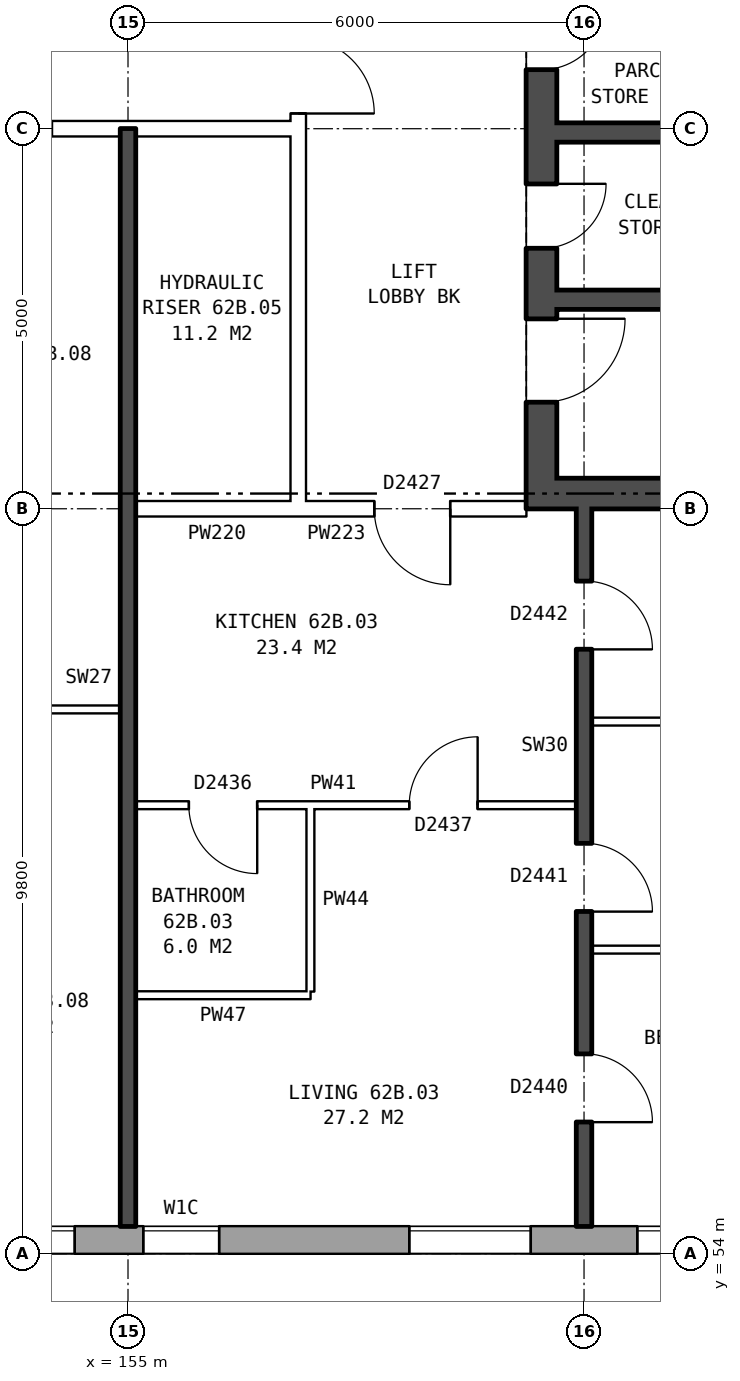
"""IFC4 building model, lengths in metres.
Left out: names, types, materials, properties, quantities, classifications, styles, units other than length and angle.
Written with IfcOpenShell. Run it as: python <this file> out.ifc"""

import sys

from ifc_helpers import new_model, si_unit, direction, frame, frame_2d, origin, place, context, subcontext, project, spatial, rectangle, extrude, element, fill, save


model = new_model("IFC4")
c1 = context("Model", 3, precision=1e-05, world=origin(), true_north=direction((0.0, 1.0)))
c2 = subcontext(c1, "Body", "Model", "MODEL_VIEW")
j1 = project(units=[si_unit("LENGTHUNIT", "METRE"), si_unit("PLANEANGLEUNIT", "RADIAN")], contexts=[c1])
p1 = place(None, origin())
s1 = spatial("IfcSite", under=j1, at=p1, CompositionType="ELEMENT")
p2 = place(p1, origin())
s2 = spatial("IfcBuilding", under=s1, at=p2, CompositionType="ELEMENT")
p3 = place(p2, frame((0.0, 0.0, 221.4)))
s3 = spatial("IfcBuildingStorey", under=s2, at=p3, CompositionType="ELEMENT", Elevation=221.4)
p4 = place(p3, frame((132.05, 54.18, 0.0), z_axis=(0.0, 0.0, 1.0), x_axis=(1.0, 0.0, 0.0)))
e1 = element("IfcWall", 1, at=p4, inside=s3, PredefinedType="STANDARD", context=c2, shape_type="SweptSolid", body=[
    extrude(rectangle(XDim=33.875, YDim=0.36, at=frame_2d((16.938, 0.0))), origin(), (0.0, 0.0, 1.0), 2.85),
])
p5 = place(p4, frame((2.65, 0.0, 0.8)))
e2 = element("IfcOpeningElement", 2, at=p5, cuts=e1, PredefinedType="OPENING", context=c2, shape_type="SweptSolid", body=[
    extrude(rectangle(XDim=1.6, YDim=1.8, at=frame_2d((0.8, 0.9))), frame((0.0, 0.19, 0.0), z_axis=(0.0, -1.0, 0.0), x_axis=(1.0, 0.0, 0.0)), (0.0, 0.0, 1.0), 0.38),
])
p6 = place(p4, frame((5.65, 0.0, 0.8)))
e3 = element("IfcOpeningElement", 3, at=p6, cuts=e1, PredefinedType="OPENING", context=c2, shape_type="SweptSolid", body=[
    extrude(rectangle(XDim=1.6, YDim=1.8, at=frame_2d((0.8, 0.9))), frame((0.0, 0.19, 0.0), z_axis=(0.0, -1.0, 0.0), x_axis=(1.0, 0.0, 0.0)), (0.0, 0.0, 1.0), 0.38),
])
p7 = place(p4, frame((7.55, 0.0, 0.8)))
e4 = element("IfcOpeningElement", 4, at=p7, cuts=e1, PredefinedType="OPENING", context=c2, shape_type="SweptSolid", body=[
    extrude(rectangle(XDim=1.6, YDim=1.8, at=frame_2d((0.8, 0.9))), frame((0.0, 0.19, 0.0), z_axis=(0.0, -1.0, 0.0), x_axis=(1.0, 0.0, 0.0)), (0.0, 0.0, 1.0), 0.38),
])
p8 = place(p4, frame((11.65, 0.0, 0.8)))
e5 = element("IfcOpeningElement", 5, at=p8, cuts=e1, PredefinedType="OPENING", context=c2, shape_type="SweptSolid", body=[
    extrude(rectangle(XDim=1.6, YDim=1.8, at=frame_2d((0.8, 0.9))), frame((0.0, 0.19, 0.0), z_axis=(0.0, -1.0, 0.0), x_axis=(1.0, 0.0, 0.0)), (0.0, 0.0, 1.0), 0.38),
])
p9 = place(p4, frame((14.65, 0.0, 0.8)))
e6 = element("IfcOpeningElement", 6, at=p9, cuts=e1, PredefinedType="OPENING", context=c2, shape_type="SweptSolid", body=[
    extrude(rectangle(XDim=1.6, YDim=1.8, at=frame_2d((0.8, 0.9))), frame((0.0, 0.19, 0.0), z_axis=(0.0, -1.0, 0.0), x_axis=(1.0, 0.0, 0.0)), (0.0, 0.0, 1.0), 0.38),
])
p10 = place(p4, frame((17.65, 0.0, 0.8)))
e7 = element("IfcOpeningElement", 7, at=p10, cuts=e1, PredefinedType="OPENING", context=c2, shape_type="SweptSolid", body=[
    extrude(rectangle(XDim=1.6, YDim=1.8, at=frame_2d((0.8, 0.9))), frame((0.0, 0.19, 0.0), z_axis=(0.0, -1.0, 0.0), x_axis=(1.0, 0.0, 0.0)), (0.0, 0.0, 1.0), 0.38),
])
p11 = place(p4, frame((20.65, 0.0, 0.8)))
e8 = element("IfcOpeningElement", 8, at=p11, cuts=e1, PredefinedType="OPENING", context=c2, shape_type="SweptSolid", body=[
    extrude(rectangle(XDim=1.6, YDim=1.8, at=frame_2d((0.8, 0.9))), frame((0.0, 0.19, 0.0), z_axis=(0.0, -1.0, 0.0), x_axis=(1.0, 0.0, 0.0)), (0.0, 0.0, 1.0), 0.38),
])
p12 = place(p4, frame((23.15, 0.0, 0.8)))
e9 = element("IfcOpeningElement", 9, at=p12, cuts=e1, PredefinedType="OPENING", context=c2, shape_type="SweptSolid", body=[
    extrude(rectangle(XDim=1.0, YDim=1.8, at=frame_2d((0.5, 0.9))), frame((0.0, 0.19, 0.0), z_axis=(0.0, -1.0, 0.0), x_axis=(1.0, 0.0, 0.0)), (0.0, 0.0, 1.0), 0.38),
])
p13 = place(p4, frame((26.65, 0.0, 0.8)))
e10 = element("IfcOpeningElement", 10, at=p13, cuts=e1, PredefinedType="OPENING", context=c2, shape_type="SweptSolid", body=[
    extrude(rectangle(XDim=1.6, YDim=1.8, at=frame_2d((0.8, 0.9))), frame((0.0, 0.19, 0.0), z_axis=(0.0, -1.0, 0.0), x_axis=(1.0, 0.0, 0.0)), (0.0, 0.0, 1.0), 0.38),
])
p14 = place(p4, frame((29.65, 0.0, 0.8)))
e11 = element("IfcOpeningElement", 11, at=p14, cuts=e1, PredefinedType="OPENING", context=c2, shape_type="SweptSolid", body=[
    extrude(rectangle(XDim=1.6, YDim=1.8, at=frame_2d((0.8, 0.9))), frame((0.0, 0.19, 0.0), z_axis=(0.0, -1.0, 0.0), x_axis=(1.0, 0.0, 0.0)), (0.0, 0.0, 1.0), 0.38),
])
p15 = place(p4, frame((9.45, 0.0, 1.7)))
e12 = element("IfcOpeningElement", 12, at=p15, cuts=e1, PredefinedType="OPENING", context=c2, shape_type="SweptSolid", body=[
    extrude(rectangle(XDim=0.6, YDim=0.9, at=frame_2d((0.3, 0.45))), frame((0.0, 0.19, 0.0), z_axis=(0.0, -1.0, 0.0), x_axis=(1.0, 0.0, 0.0)), (0.0, 0.0, 1.0), 0.38),
])
p16 = place(p3, frame((160.44, 76.2, 0.0), z_axis=(0.0, 0.0, 1.0), x_axis=(0.0, -1.0, 0.0)))
e13 = element("IfcWall", 13, at=p16, inside=s3, PredefinedType="SHEAR", context=c2, shape_type="SweptSolid", body=[
    extrude(rectangle(XDim=12.4, YDim=0.4, at=frame_2d((6.2, 0.0))), origin(), (0.0, 0.0, 1.0), 2.85),
])
p17 = place(p16, frame((1.325, 0.0, 0.0)))
e14 = element("IfcOpeningElement", 14, at=p17, cuts=e13, PredefinedType="OPENING", context=c2, shape_type="SweptSolid", body=[
    extrude(rectangle(XDim=1.1, YDim=2.1, at=frame_2d((0.55, 1.05))), frame((0.0, 0.21, 0.0), z_axis=(0.0, -1.0, 0.0), x_axis=(1.0, 0.0, 0.0)), (0.0, 0.0, 1.0), 0.42),
])
p18 = place(p16, frame((3.625, 0.0, 0.0)))
e15 = element("IfcOpeningElement", 15, at=p18, cuts=e13, PredefinedType="OPENING", context=c2, shape_type="SweptSolid", body=[
    extrude(rectangle(XDim=0.85, YDim=2.1, at=frame_2d((0.425, 1.05))), frame((0.0, 0.21, 0.0), z_axis=(0.0, -1.0, 0.0), x_axis=(1.0, 0.0, 0.0)), (0.0, 0.0, 1.0), 0.42),
])
p19 = place(p16, frame((5.775, 0.0, 0.0)))
e16 = element("IfcOpeningElement", 16, at=p19, cuts=e13, PredefinedType="OPENING", context=c2, shape_type="SweptSolid", body=[
    extrude(rectangle(XDim=0.85, YDim=2.1, at=frame_2d((0.425, 1.05))), frame((0.0, 0.21, 0.0), z_axis=(0.0, -1.0, 0.0), x_axis=(1.0, 0.0, 0.0)), (0.0, 0.0, 1.0), 0.42),
])
p20 = place(p16, frame((9.9, 0.0, 0.0)))
e17 = element("IfcOpeningElement", 17, at=p20, cuts=e13, PredefinedType="OPENING", context=c2, shape_type="SweptSolid", body=[
    extrude(rectangle(XDim=1.1, YDim=2.1, at=frame_2d((0.55, 1.05))), frame((0.0, 0.21, 0.0), z_axis=(0.0, -1.0, 0.0), x_axis=(1.0, 0.0, 0.0)), (0.0, 0.0, 1.0), 0.42),
])
p21 = place(p16, frame((8.125, 0.0, 0.0)))
e18 = element("IfcOpeningElement", 18, at=p21, cuts=e13, PredefinedType="OPENING", context=c2, shape_type="SweptSolid", body=[
    extrude(rectangle(XDim=0.85, YDim=2.1, at=frame_2d((0.425, 1.05))), frame((0.0, 0.21, 0.0), z_axis=(0.0, -1.0, 0.0), x_axis=(1.0, 0.0, 0.0)), (0.0, 0.0, 1.0), 0.42),
])
p22 = place(p3, frame((160.64, 64.0, 0.0), z_axis=(0.0, 0.0, 1.0), x_axis=(1.0, 0.0, 0.0)))
e19 = element("IfcWall", 19, at=p22, inside=s3, PredefinedType="SHEAR", context=c2, shape_type="SweptSolid", body=[
    extrude(rectangle(XDim=7.6, YDim=0.4, at=frame_2d((3.8, 0.0))), origin(), (0.0, 0.0, 1.0), 2.85),
])
p23 = place(p3, frame((160.64, 68.75, 0.0), z_axis=(0.0, 0.0, 1.0), x_axis=(1.0, 0.0, 0.0)))
e20 = element("IfcWall", 20, at=p23, inside=s3, PredefinedType="SHEAR", context=c2, shape_type="SweptSolid", body=[
    extrude(rectangle(XDim=7.6, YDim=0.25, at=frame_2d((3.8, 0.0))), origin(), (0.0, 0.0, 1.0), 2.85),
])
p24 = place(p23, frame((5.175, 0.0, 0.0)))
e21 = element("IfcOpeningElement", 21, at=p24, cuts=e20, PredefinedType="OPENING", context=c2, shape_type="SweptSolid", body=[
    extrude(rectangle(XDim=1.1, YDim=2.1, at=frame_2d((0.55, 1.05))), frame((0.0, 0.135, 0.0), z_axis=(0.0, -1.0, 0.0), x_axis=(1.0, 0.0, 0.0)), (0.0, 0.0, 1.0), 0.27),
])
p25 = place(p23, frame((3.35, 0.0, 0.0)))
e22 = element("IfcOpeningElement", 22, at=p25, cuts=e20, PredefinedType="OPENING", context=c2, shape_type="SweptSolid", body=[
    extrude(rectangle(XDim=0.85, YDim=2.1, at=frame_2d((0.425, 1.05))), frame((0.0, 0.135, 0.0), z_axis=(0.0, -1.0, 0.0), x_axis=(1.0, 0.0, 0.0)), (0.0, 0.0, 1.0), 0.27),
])
p26 = place(p3, frame((160.64, 66.55, 0.0), z_axis=(0.0, 0.0, 1.0), x_axis=(1.0, 0.0, 0.0)))
e23 = element("IfcWall", 23, at=p26, inside=s3, PredefinedType="SHEAR", context=c2, shape_type="SweptSolid", body=[
    extrude(rectangle(XDim=2.525, YDim=0.25, at=frame_2d((1.263, 0.0))), origin(), (0.0, 0.0, 1.0), 2.85),
])
p27 = place(p3, frame((157.24, 63.9, 0.0), z_axis=(0.0, 0.0, 1.0), x_axis=(0.0, 1.0, 0.0)))
e24 = element("IfcWall", 24, at=p27, inside=s3, PredefinedType="PARTITIONING", context=c2, shape_type="SweptSolid", body=[
    extrude(rectangle(XDim=12.2, YDim=0.2, at=frame_2d((6.1, 0.0))), origin(), (0.0, 0.0, 1.0), 2.85),
])
p28 = place(p27, frame((5.1, 0.0, 0.0)))
e25 = element("IfcOpeningElement", 25, at=p28, cuts=e24, PredefinedType="OPENING", context=c2, shape_type="SweptSolid", body=[
    extrude(rectangle(XDim=2.0, YDim=2.1, at=frame_2d((1.0, 1.05))), frame((0.0, 0.11, 0.0), z_axis=(0.0, -1.0, 0.0), x_axis=(1.0, 0.0, 0.0)), (0.0, 0.0, 1.0), 0.22),
])
p29 = place(p3, frame((155.1, 57.4, 0.0), z_axis=(0.0, 0.0, 1.0), x_axis=(1.0, 0.0, 0.0)))
e26 = element("IfcWall", 26, at=p29, inside=s3, PredefinedType="PARTITIONING", context=c2, shape_type="SweptSolid", body=[
    extrude(rectangle(XDim=2.3, YDim=0.1, at=frame_2d((1.15, 0.0))), origin(), (0.0, 0.0, 1.0), 2.85),
])
p30 = place(p3, frame((161.1, 58.0, 0.0), z_axis=(0.0, 0.0, 1.0), x_axis=(1.0, 0.0, 0.0)))
e27 = element("IfcWall", 27, at=p30, inside=s3, PredefinedType="PARTITIONING", context=c2, shape_type="SweptSolid", body=[
    extrude(rectangle(XDim=7.54, YDim=0.1, at=frame_2d((3.77, 0.0))), origin(), (0.0, 0.0, 1.0), 2.85),
])
p31 = place(p3, frame((155.1, 59.9, 0.0), z_axis=(0.0, 0.0, 1.0), x_axis=(1.0, 0.0, 0.0)))
e28 = element("IfcWall", 28, at=p31, inside=s3, PredefinedType="PARTITIONING", context=c2, shape_type="SweptSolid", body=[
    extrude(rectangle(XDim=5.8, YDim=0.1, at=frame_2d((2.9, 0.0))), origin(), (0.0, 0.0, 1.0), 2.85),
])
p32 = place(p31, frame((3.6, 0.0, 0.0)))
e29 = element("IfcOpeningElement", 29, at=p32, cuts=e28, PredefinedType="OPENING", context=c2, shape_type="SweptSolid", body=[
    extrude(rectangle(XDim=0.9, YDim=2.1, at=frame_2d((0.45, 1.05))), frame((0.0, 0.06, 0.0), z_axis=(0.0, -1.0, 0.0), x_axis=(1.0, 0.0, 0.0)), (0.0, 0.0, 1.0), 0.12),
])
p33 = place(p31, frame((0.7, 0.0, 0.0)))
e30 = element("IfcOpeningElement", 30, at=p33, cuts=e28, PredefinedType="OPENING", context=c2, shape_type="SweptSolid", body=[
    extrude(rectangle(XDim=0.9, YDim=2.1, at=frame_2d((0.45, 1.05))), frame((0.0, 0.06, 0.0), z_axis=(0.0, -1.0, 0.0), x_axis=(1.0, 0.0, 0.0)), (0.0, 0.0, 1.0), 0.12),
])
p34 = place(p3, frame((161.1, 61.0, 0.0), z_axis=(0.0, 0.0, 1.0), x_axis=(1.0, 0.0, 0.0)))
e31 = element("IfcWall", 31, at=p34, inside=s3, PredefinedType="PARTITIONING", context=c2, shape_type="SweptSolid", body=[
    extrude(rectangle(XDim=7.54, YDim=0.1, at=frame_2d((3.77, 0.0))), origin(), (0.0, 0.0, 1.0), 2.85),
])
p35 = place(p3, frame((152.0, 61.16, 0.0), z_axis=(0.0, 0.0, 1.0), x_axis=(1.0, 0.0, 0.0)))
e32 = element("IfcWall", 32, at=p35, inside=s3, PredefinedType="PARTITIONING", context=c2, shape_type="SweptSolid", body=[
    extrude(rectangle(XDim=2.9, YDim=0.1, at=frame_2d((1.45, 0.0))), origin(), (0.0, 0.0, 1.0), 2.85),
])
p36 = place(p35, frame((1.0, 0.0, 0.0)))
e33 = element("IfcOpeningElement", 33, at=p36, cuts=e32, PredefinedType="OPENING", context=c2, shape_type="SweptSolid", body=[
    extrude(rectangle(XDim=0.9, YDim=2.1, at=frame_2d((0.45, 1.05))), frame((0.0, 0.06, 0.0), z_axis=(0.0, -1.0, 0.0), x_axis=(1.0, 0.0, 0.0)), (0.0, 0.0, 1.0), 0.12),
])
p37 = place(p3, frame((155.1, 63.8, 0.0), z_axis=(0.0, 0.0, 1.0), x_axis=(1.0, 0.0, 0.0)))
e34 = element("IfcWall", 34, at=p37, inside=s3, PredefinedType="PARTITIONING", context=c2, shape_type="SweptSolid", body=[
    extrude(rectangle(XDim=2.14, YDim=0.2, at=frame_2d((1.07, 0.0))), origin(), (0.0, 0.0, 1.0), 2.85),
])
p38 = place(p3, frame((157.24, 63.8, 0.0), z_axis=(0.0, 0.0, 1.0), x_axis=(1.0, 0.0, 0.0)))
e35 = element("IfcWall", 35, at=p38, inside=s3, PredefinedType="PARTITIONING", context=c2, shape_type="SweptSolid", body=[
    extrude(rectangle(XDim=3.0, YDim=0.2, at=frame_2d((1.5, 0.0))), origin(), (0.0, 0.0, 1.0), 2.85),
])
p39 = place(p38, frame((1.0, 0.0, 0.0)))
e36 = element("IfcOpeningElement", 36, at=p39, cuts=e35, PredefinedType="OPENING", context=c2, shape_type="SweptSolid", body=[
    extrude(rectangle(XDim=1.0, YDim=2.1, at=frame_2d((0.5, 1.05))), frame((0.0, 0.11, 0.0), z_axis=(0.0, -1.0, 0.0), x_axis=(1.0, 0.0, 0.0)), (0.0, 0.0, 1.0), 0.22),
])
p40 = place(p3, frame((142.76, 68.8, 0.0), z_axis=(0.0, 0.0, 1.0), x_axis=(1.0, 0.0, 0.0)))
e37 = element("IfcWall", 37, at=p40, inside=s3, PredefinedType="PARTITIONING", context=c2, shape_type="SweptSolid", body=[
    extrude(rectangle(XDim=14.48, YDim=0.2, at=frame_2d((7.24, 0.0))), origin(), (0.0, 0.0, 1.0), 2.85),
])
p41 = place(p40, frame((1.12, 0.0, 0.0)))
e38 = element("IfcOpeningElement", 38, at=p41, cuts=e37, PredefinedType="OPENING", context=c2, shape_type="SweptSolid", body=[
    extrude(rectangle(XDim=1.0, YDim=2.1, at=frame_2d((0.5, 1.05))), frame((0.0, 0.11, 0.0), z_axis=(0.0, -1.0, 0.0), x_axis=(1.0, 0.0, 0.0)), (0.0, 0.0, 1.0), 0.22),
])
p42 = place(p40, frame((10.24, 0.0, 0.0)))
e39 = element("IfcOpeningElement", 39, at=p42, cuts=e37, PredefinedType="OPENING", context=c2, shape_type="SweptSolid", body=[
    extrude(rectangle(XDim=1.0, YDim=2.1, at=frame_2d((0.5, 1.05))), frame((0.0, 0.11, 0.0), z_axis=(0.0, -1.0, 0.0), x_axis=(1.0, 0.0, 0.0)), (0.0, 0.0, 1.0), 0.22),
])
p43 = place(p3, frame((155.0, 54.36, 0.0), z_axis=(0.0, 0.0, 1.0), x_axis=(0.0, 1.0, 0.0)))
e40 = element("IfcWall", 40, at=p43, inside=s3, PredefinedType="SOLIDWALL", context=c2, shape_type="SweptSolid", body=[
    extrude(rectangle(XDim=14.44, YDim=0.2, at=frame_2d((7.22, 0.0))), origin(), (0.0, 0.0, 1.0), 2.85),
])
p44 = place(p3, frame((157.4, 57.45, 0.0), z_axis=(0.0, 0.0, 1.0), x_axis=(0.0, 1.0, 0.0)))
e41 = element("IfcWall", 41, at=p44, inside=s3, PredefinedType="PARTITIONING", context=c2, shape_type="SweptSolid", body=[
    extrude(rectangle(XDim=2.4, YDim=0.1, at=frame_2d((1.2, 0.0))), origin(), (0.0, 0.0, 1.0), 2.85),
])
p45 = place(p3, frame((161.0, 54.36, 0.0), z_axis=(0.0, 0.0, 1.0), x_axis=(0.0, 1.0, 0.0)))
e42 = element("IfcWall", 42, at=p45, inside=s3, PredefinedType="SOLIDWALL", context=c2, shape_type="SweptSolid", body=[
    extrude(rectangle(XDim=9.44, YDim=0.2, at=frame_2d((4.72, 0.0))), origin(), (0.0, 0.0, 1.0), 2.85),
])
p46 = place(p45, frame((1.37, 0.0, 0.0)))
e43 = element("IfcOpeningElement", 43, at=p46, cuts=e42, PredefinedType="OPENING", context=c2, shape_type="SweptSolid", body=[
    extrude(rectangle(XDim=0.9, YDim=2.1, at=frame_2d((0.45, 1.05))), frame((0.0, 0.11, 0.0), z_axis=(0.0, -1.0, 0.0), x_axis=(1.0, 0.0, 0.0)), (0.0, 0.0, 1.0), 0.22),
])
p47 = place(p45, frame((4.14, 0.0, 0.0)))
e44 = element("IfcOpeningElement", 44, at=p47, cuts=e42, PredefinedType="OPENING", context=c2, shape_type="SweptSolid", body=[
    extrude(rectangle(XDim=0.9, YDim=2.1, at=frame_2d((0.45, 1.05))), frame((0.0, 0.11, 0.0), z_axis=(0.0, -1.0, 0.0), x_axis=(1.0, 0.0, 0.0)), (0.0, 0.0, 1.0), 0.22),
])
p48 = place(p45, frame((7.59, 0.0, 0.0)))
e45 = element("IfcOpeningElement", 45, at=p48, cuts=e42, PredefinedType="OPENING", context=c2, shape_type="SweptSolid", body=[
    extrude(rectangle(XDim=0.9, YDim=2.1, at=frame_2d((0.45, 1.05))), frame((0.0, 0.11, 0.0), z_axis=(0.0, -1.0, 0.0), x_axis=(1.0, 0.0, 0.0)), (0.0, 0.0, 1.0), 0.22),
])
p49 = place(p11, origin())
e46 = element("IfcWindow", 46, at=p49, inside=s3, PartitioningType="SINGLE_PANEL", PredefinedType="WINDOW", context=c2, shape_type="SweptSolid", body=[
    extrude(rectangle(XDim=1.6, YDim=1.8, at=frame_2d((0.8, 0.9))), frame((0.0, 0.15, 0.0), z_axis=(0.0, -1.0, 0.0), x_axis=(1.0, 0.0, 0.0)), (0.0, 0.0, 1.0), 0.06),
])
fill(e8, e46)
p50 = place(p12, origin())
e47 = element("IfcWindow", 47, at=p50, inside=s3, PartitioningType="SINGLE_PANEL", PredefinedType="WINDOW", context=c2, shape_type="SweptSolid", body=[
    extrude(rectangle(XDim=1.0, YDim=1.8, at=frame_2d((0.5, 0.9))), frame((0.0, 0.15, 0.0), z_axis=(0.0, -1.0, 0.0), x_axis=(1.0, 0.0, 0.0)), (0.0, 0.0, 1.0), 0.06),
])
fill(e9, e47)
p51 = place(p13, origin())
e48 = element("IfcWindow", 48, at=p51, inside=s3, PartitioningType="SINGLE_PANEL", PredefinedType="WINDOW", context=c2, shape_type="SweptSolid", body=[
    extrude(rectangle(XDim=1.6, YDim=1.8, at=frame_2d((0.8, 0.9))), frame((0.0, 0.15, 0.0), z_axis=(0.0, -1.0, 0.0), x_axis=(1.0, 0.0, 0.0)), (0.0, 0.0, 1.0), 0.06),
])
fill(e10, e48)
p52 = place(p14, origin())
e49 = element("IfcWindow", 49, at=p52, inside=s3, PartitioningType="SINGLE_PANEL", PredefinedType="WINDOW", context=c2, shape_type="SweptSolid", body=[
    extrude(rectangle(XDim=1.6, YDim=1.8, at=frame_2d((0.8, 0.9))), frame((0.0, 0.15, 0.0), z_axis=(0.0, -1.0, 0.0), x_axis=(1.0, 0.0, 0.0)), (0.0, 0.0, 1.0), 0.06),
])
fill(e11, e49)
p53 = place(p19, origin())
e50 = element("IfcDoor", 50, at=p53, inside=s3, OperationType="SINGLE_SWING_LEFT", PredefinedType="DOOR", context=c2, shape_type="SweptSolid", body=[
    extrude(rectangle(XDim=0.85, YDim=2.1, at=frame_2d((0.425, 1.05))), frame((0.0, 0.185, 0.0), z_axis=(0.0, -1.0, 0.0), x_axis=(1.0, 0.0, 0.0)), (0.0, 0.0, 1.0), 0.05),
])
fill(e16, e50)
p54 = place(p20, origin())
e51 = element("IfcDoor", 51, at=p54, inside=s3, OperationType="SINGLE_SWING_LEFT", PredefinedType="DOOR", context=c2, shape_type="SweptSolid", body=[
    extrude(rectangle(XDim=1.1, YDim=2.1, at=frame_2d((0.55, 1.05))), frame((0.0, 0.185, 0.0), z_axis=(0.0, -1.0, 0.0), x_axis=(1.0, 0.0, 0.0)), (0.0, 0.0, 1.0), 0.05),
])
fill(e17, e51)
p55 = place(p21, origin())
e52 = element("IfcDoor", 52, at=p55, inside=s3, OperationType="SINGLE_SWING_LEFT", PredefinedType="DOOR", context=c2, shape_type="SweptSolid", body=[
    extrude(rectangle(XDim=0.85, YDim=2.1, at=frame_2d((0.425, 1.05))), frame((0.0, 0.185, 0.0), z_axis=(0.0, -1.0, 0.0), x_axis=(1.0, 0.0, 0.0)), (0.0, 0.0, 1.0), 0.05),
])
fill(e18, e52)
p56 = place(p28, frame((2.0, 0.0, 0.0), z_axis=(0.0, 0.0, 1.0), x_axis=(-1.0, 0.0, 0.0)))
e53 = element("IfcDoor", 53, at=p56, inside=s3, OperationType="DOUBLE_DOOR_SINGLE_SWING", PredefinedType="DOOR", context=c2, shape_type="SweptSolid", body=[
    extrude(rectangle(XDim=2.0, YDim=2.1, at=frame_2d((1.0, 1.05))), frame((0.0, 0.025, 0.0), z_axis=(0.0, -1.0, 0.0), x_axis=(1.0, 0.0, 0.0)), (0.0, 0.0, 1.0), 0.05),
])
fill(e25, e53)
p57 = place(p46, frame((0.9, 0.0, 0.0), z_axis=(0.0, 0.0, 1.0), x_axis=(-1.0, 0.0, 0.0)))
e54 = element("IfcDoor", 54, at=p57, inside=s3, OperationType="SINGLE_SWING_RIGHT", PredefinedType="DOOR", context=c2, shape_type="SweptSolid", body=[
    extrude(rectangle(XDim=0.9, YDim=2.1, at=frame_2d((0.45, 1.05))), frame((0.0, 0.025, 0.0), z_axis=(0.0, -1.0, 0.0), x_axis=(1.0, 0.0, 0.0)), (0.0, 0.0, 1.0), 0.05),
])
fill(e43, e54)
p58 = place(p47, frame((0.9, 0.0, 0.0), z_axis=(0.0, 0.0, 1.0), x_axis=(-1.0, 0.0, 0.0)))
e55 = element("IfcDoor", 55, at=p58, inside=s3, OperationType="SINGLE_SWING_RIGHT", PredefinedType="DOOR", context=c2, shape_type="SweptSolid", body=[
    extrude(rectangle(XDim=0.9, YDim=2.1, at=frame_2d((0.45, 1.05))), frame((0.0, 0.025, 0.0), z_axis=(0.0, -1.0, 0.0), x_axis=(1.0, 0.0, 0.0)), (0.0, 0.0, 1.0), 0.05),
])
fill(e44, e55)
p59 = place(p48, frame((0.9, 0.0, 0.0), z_axis=(0.0, 0.0, 1.0), x_axis=(-1.0, 0.0, 0.0)))
e56 = element("IfcDoor", 56, at=p59, inside=s3, OperationType="SINGLE_SWING_RIGHT", PredefinedType="DOOR", context=c2, shape_type="SweptSolid", body=[
    extrude(rectangle(XDim=0.9, YDim=2.1, at=frame_2d((0.45, 1.05))), frame((0.0, 0.025, 0.0), z_axis=(0.0, -1.0, 0.0), x_axis=(1.0, 0.0, 0.0)), (0.0, 0.0, 1.0), 0.05),
])
fill(e45, e56)
p60 = place(p39, frame((1.0, 0.0, 0.0), z_axis=(0.0, 0.0, 1.0), x_axis=(-1.0, 0.0, 0.0)))
e57 = element("IfcDoor", 57, at=p60, inside=s3, OperationType="SINGLE_SWING_LEFT", PredefinedType="DOOR", context=c2, shape_type="SweptSolid", body=[
    extrude(rectangle(XDim=1.0, YDim=2.1, at=frame_2d((0.5, 1.05))), frame((0.0, 0.025, 0.0), z_axis=(0.0, -1.0, 0.0), x_axis=(1.0, 0.0, 0.0)), (0.0, 0.0, 1.0), 0.05),
])
fill(e36, e57)
p61 = place(p32, origin())
e58 = element("IfcDoor", 58, at=p61, inside=s3, OperationType="SINGLE_SWING_RIGHT", PredefinedType="DOOR", context=c2, shape_type="SweptSolid", body=[
    extrude(rectangle(XDim=0.9, YDim=2.1, at=frame_2d((0.45, 1.05))), frame((0.0, 0.025, 0.0), z_axis=(0.0, -1.0, 0.0), x_axis=(1.0, 0.0, 0.0)), (0.0, 0.0, 1.0), 0.05),
])
fill(e29, e58)
p62 = place(p33, frame((0.9, 0.0, 0.0), z_axis=(0.0, 0.0, 1.0), x_axis=(-1.0, 0.0, 0.0)))
e59 = element("IfcDoor", 59, at=p62, inside=s3, OperationType="SINGLE_SWING_LEFT", PredefinedType="DOOR", context=c2, shape_type="SweptSolid", body=[
    extrude(rectangle(XDim=0.9, YDim=2.1, at=frame_2d((0.45, 1.05))), frame((0.0, 0.025, 0.0), z_axis=(0.0, -1.0, 0.0), x_axis=(1.0, 0.0, 0.0)), (0.0, 0.0, 1.0), 0.05),
])
fill(e30, e59)
save(model, sys.argv[1])
